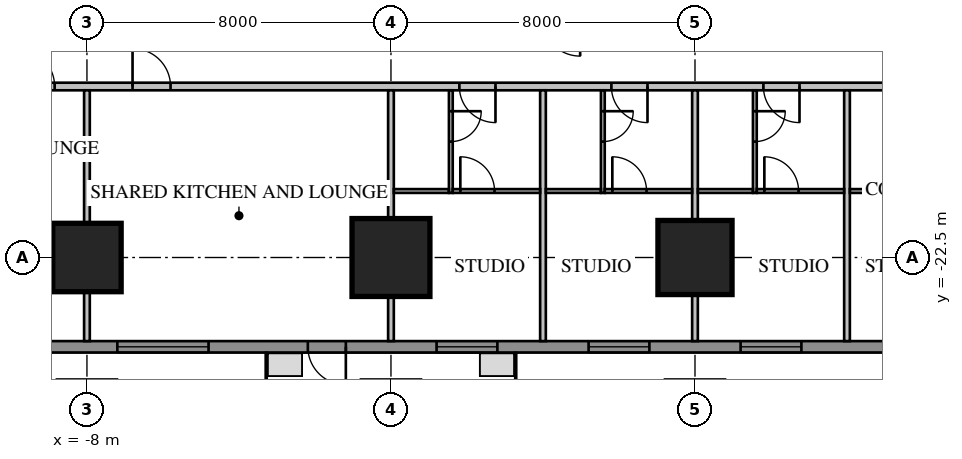
"""IFC4 building model, lengths in metres.
Left out: names, types, materials, properties, quantities, classifications, styles, units other than length and angle.
Written with IfcOpenShell. Run it as: python <this file> out.ifc"""

import sys

from ifc_helpers import new_model, si_unit, direction, frame, frame_2d, origin, origin_2d, place, context, subcontext, project, spatial, rectangle, extrude, element, fill, save


model = new_model("IFC4")
c1 = context("Model", 3, precision=1e-05, world=origin(), true_north=direction((0.0, 1.0)))
c2 = subcontext(c1, "Body", "Model", "MODEL_VIEW")
j1 = project(units=[si_unit("LENGTHUNIT", "METRE"), si_unit("PLANEANGLEUNIT", "RADIAN")], contexts=[c1])
p1 = place(None, origin())
s1 = spatial("IfcSite", under=j1, at=p1, CompositionType="ELEMENT")
p2 = place(p1, origin())
s2 = spatial("IfcBuilding", under=s1, at=p2, CompositionType="ELEMENT")
p3 = place(p2, frame((0.0, 0.0, 19.85)))
s3 = spatial("IfcBuildingStorey", under=s2, at=p3, CompositionType="ELEMENT", Elevation=19.85)
p4 = place(p3, frame((-8.0, -22.5, 0.0), z_axis=(0.0, 0.0, 1.0), x_axis=(1.0, 0.0, 0.0)))
e1 = element("IfcColumn", 1, at=p4, inside=s3, PredefinedType="COLUMN", context=c2, shape_type="SweptSolid", body=[
    extrude(rectangle(XDim=1.8, YDim=1.8, at=origin_2d()), origin(), (0.0, 0.0, 1.0), 3.85),
])
p5 = place(p3, frame((0.0, -22.5, 0.0), z_axis=(0.0, 0.0, 1.0), x_axis=(1.0, 0.0, 0.0)))
e2 = element("IfcColumn", 2, at=p5, inside=s3, PredefinedType="COLUMN", context=c2, shape_type="SweptSolid", body=[
    extrude(rectangle(XDim=2.05, YDim=2.05, at=origin_2d()), origin(), (0.0, 0.0, 1.0), 3.85),
])
p6 = place(p3, frame((8.0, -22.5, 0.0), z_axis=(0.0, 0.0, 1.0), x_axis=(1.0, 0.0, 0.0)))
e3 = element("IfcColumn", 3, at=p6, inside=s3, PredefinedType="COLUMN", context=c2, shape_type="SweptSolid", body=[
    extrude(rectangle(XDim=1.95, YDim=1.95, at=origin_2d()), origin(), (0.0, 0.0, 1.0), 3.85),
])
p7 = place(p3, frame((-16.0, -24.85, 0.0), z_axis=(0.0, 0.0, 1.0), x_axis=(1.0, 0.0, 0.0)))
e4 = element("IfcWall", 4, at=p7, inside=s3, PredefinedType="SOLIDWALL", context=c2, shape_type="SweptSolid", body=[
    extrude(rectangle(XDim=32.0, YDim=0.3, at=frame_2d((16.0, 0.0))), origin(), (0.0, 0.0, 1.0), 3.65),
])
p8 = place(p7, frame((1.2, 0.0, 0.75)))
e5 = element("IfcOpeningElement", 5, at=p8, cuts=e4, PredefinedType="OPENING", context=c2, shape_type="SweptSolid", body=[
    extrude(rectangle(XDim=1.6, YDim=1.8, at=frame_2d((0.8, 0.9))), frame((0.0, 0.17, 0.0), z_axis=(0.0, -1.0, 0.0), x_axis=(1.0, 0.0, 0.0)), (0.0, 0.0, 1.0), 0.34),
])
p9 = place(p7, frame((5.2, 0.0, 0.75)))
e6 = element("IfcOpeningElement", 6, at=p9, cuts=e4, PredefinedType="OPENING", context=c2, shape_type="SweptSolid", body=[
    extrude(rectangle(XDim=1.6, YDim=1.8, at=frame_2d((0.8, 0.9))), frame((0.0, 0.17, 0.0), z_axis=(0.0, -1.0, 0.0), x_axis=(1.0, 0.0, 0.0)), (0.0, 0.0, 1.0), 0.34),
])
p10 = place(p7, frame((17.2, 0.0, 0.75)))
e7 = element("IfcOpeningElement", 7, at=p10, cuts=e4, PredefinedType="OPENING", context=c2, shape_type="SweptSolid", body=[
    extrude(rectangle(XDim=1.6, YDim=1.8, at=frame_2d((0.8, 0.9))), frame((0.0, 0.17, 0.0), z_axis=(0.0, -1.0, 0.0), x_axis=(1.0, 0.0, 0.0)), (0.0, 0.0, 1.0), 0.34),
])
p11 = place(p7, frame((21.2, 0.0, 0.75)))
e8 = element("IfcOpeningElement", 8, at=p11, cuts=e4, PredefinedType="OPENING", context=c2, shape_type="SweptSolid", body=[
    extrude(rectangle(XDim=1.6, YDim=1.8, at=frame_2d((0.8, 0.9))), frame((0.0, 0.17, 0.0), z_axis=(0.0, -1.0, 0.0), x_axis=(1.0, 0.0, 0.0)), (0.0, 0.0, 1.0), 0.34),
])
p12 = place(p7, frame((25.2, 0.0, 0.75)))
e9 = element("IfcOpeningElement", 9, at=p12, cuts=e4, PredefinedType="OPENING", context=c2, shape_type="SweptSolid", body=[
    extrude(rectangle(XDim=1.6, YDim=1.8, at=frame_2d((0.8, 0.9))), frame((0.0, 0.17, 0.0), z_axis=(0.0, -1.0, 0.0), x_axis=(1.0, 0.0, 0.0)), (0.0, 0.0, 1.0), 0.34),
])
p13 = place(p7, frame((29.2, 0.0, 0.75)))
e10 = element("IfcOpeningElement", 10, at=p13, cuts=e4, PredefinedType="OPENING", context=c2, shape_type="SweptSolid", body=[
    extrude(rectangle(XDim=1.6, YDim=1.8, at=frame_2d((0.8, 0.9))), frame((0.0, 0.17, 0.0), z_axis=(0.0, -1.0, 0.0), x_axis=(1.0, 0.0, 0.0)), (0.0, 0.0, 1.0), 0.34),
])
p14 = place(p7, frame((8.8, 0.0, 0.75)))
e11 = element("IfcOpeningElement", 11, at=p14, cuts=e4, PredefinedType="OPENING", context=c2, shape_type="SweptSolid", body=[
    extrude(rectangle(XDim=2.4, YDim=1.8, at=frame_2d((1.2, 0.9))), frame((0.0, 0.17, 0.0), z_axis=(0.0, -1.0, 0.0), x_axis=(1.0, 0.0, 0.0)), (0.0, 0.0, 1.0), 0.34),
])
p15 = place(p7, frame((13.812, 0.0, 0.0)))
e12 = element("IfcOpeningElement", 12, at=p15, cuts=e4, PredefinedType="OPENING", context=c2, shape_type="SweptSolid", body=[
    extrude(rectangle(XDim=1.0, YDim=2.4, at=frame_2d((0.5, 1.2))), frame((0.0, 0.17, 0.0), z_axis=(0.0, -1.0, 0.0), x_axis=(1.0, 0.0, 0.0)), (0.0, 0.0, 1.0), 0.34),
])
p16 = place(p3, frame((-18.0, -18.0, 0.0), z_axis=(0.0, 0.0, 1.0), x_axis=(1.0, 0.0, 0.0)))
e13 = element("IfcWall", 13, at=p16, inside=s3, PredefinedType="PARTITIONING", context=c2, shape_type="SweptSolid", body=[
    extrude(rectangle(XDim=36.0, YDim=0.2, at=frame_2d((18.0, 0.0))), origin(), (0.0, 0.0, 1.0), 3.65),
])
p17 = place(p16, frame((0.375, 0.0, 0.0)))
e14 = element("IfcOpeningElement", 14, at=p17, cuts=e13, PredefinedType="OPENING", context=c2, shape_type="SweptSolid", body=[
    extrude(rectangle(XDim=1.0, YDim=2.1, at=frame_2d((0.5, 1.05))), frame((0.0, 0.12, 0.0), z_axis=(0.0, -1.0, 0.0), x_axis=(1.0, 0.0, 0.0)), (0.0, 0.0, 1.0), 0.24),
])
p18 = place(p16, frame((2.45, 0.0, 0.0)))
e15 = element("IfcOpeningElement", 15, at=p18, cuts=e13, PredefinedType="OPENING", context=c2, shape_type="SweptSolid", body=[
    extrude(rectangle(XDim=0.8, YDim=2.1, at=frame_2d((0.4, 1.05))), frame((0.0, 0.12, 0.0), z_axis=(0.0, -1.0, 0.0), x_axis=(1.0, 0.0, 0.0)), (0.0, 0.0, 1.0), 0.24),
])
p19 = place(p16, frame((4.05, 0.0, 0.0)))
e16 = element("IfcOpeningElement", 16, at=p19, cuts=e13, PredefinedType="OPENING", context=c2, shape_type="SweptSolid", body=[
    extrude(rectangle(XDim=1.0, YDim=2.1, at=frame_2d((0.5, 1.05))), frame((0.0, 0.12, 0.0), z_axis=(0.0, -1.0, 0.0), x_axis=(1.0, 0.0, 0.0)), (0.0, 0.0, 1.0), 0.24),
])
p20 = place(p16, frame((6.45, 0.0, 0.0)))
e17 = element("IfcOpeningElement", 17, at=p20, cuts=e13, PredefinedType="OPENING", context=c2, shape_type="SweptSolid", body=[
    extrude(rectangle(XDim=0.9, YDim=2.1, at=frame_2d((0.45, 1.05))), frame((0.0, 0.12, 0.0), z_axis=(0.0, -1.0, 0.0), x_axis=(1.0, 0.0, 0.0)), (0.0, 0.0, 1.0), 0.24),
])
p21 = place(p16, frame((8.15, 0.0, 0.0)))
e18 = element("IfcOpeningElement", 18, at=p21, cuts=e13, PredefinedType="OPENING", context=c2, shape_type="SweptSolid", body=[
    extrude(rectangle(XDim=1.0, YDim=2.1, at=frame_2d((0.5, 1.05))), frame((0.0, 0.12, 0.0), z_axis=(0.0, -1.0, 0.0), x_axis=(1.0, 0.0, 0.0)), (0.0, 0.0, 1.0), 0.24),
])
p22 = place(p16, frame((19.8, 0.0, 0.0)))
e19 = element("IfcOpeningElement", 19, at=p22, cuts=e13, PredefinedType="OPENING", context=c2, shape_type="SweptSolid", body=[
    extrude(rectangle(XDim=0.95, YDim=2.1, at=frame_2d((0.475, 1.05))), frame((0.0, 0.12, 0.0), z_axis=(0.0, -1.0, 0.0), x_axis=(1.0, 0.0, 0.0)), (0.0, 0.0, 1.0), 0.24),
])
p23 = place(p16, frame((23.8, 0.0, 0.0)))
e20 = element("IfcOpeningElement", 20, at=p23, cuts=e13, PredefinedType="OPENING", context=c2, shape_type="SweptSolid", body=[
    extrude(rectangle(XDim=0.95, YDim=2.1, at=frame_2d((0.475, 1.05))), frame((0.0, 0.12, 0.0), z_axis=(0.0, -1.0, 0.0), x_axis=(1.0, 0.0, 0.0)), (0.0, 0.0, 1.0), 0.24),
])
p24 = place(p16, frame((27.8, 0.0, 0.0)))
e21 = element("IfcOpeningElement", 21, at=p24, cuts=e13, PredefinedType="OPENING", context=c2, shape_type="SweptSolid", body=[
    extrude(rectangle(XDim=0.95, YDim=2.1, at=frame_2d((0.475, 1.05))), frame((0.0, 0.12, 0.0), z_axis=(0.0, -1.0, 0.0), x_axis=(1.0, 0.0, 0.0)), (0.0, 0.0, 1.0), 0.24),
])
p25 = place(p16, frame((31.8, 0.0, 0.0)))
e22 = element("IfcOpeningElement", 22, at=p25, cuts=e13, PredefinedType="OPENING", context=c2, shape_type="SweptSolid", body=[
    extrude(rectangle(XDim=0.95, YDim=2.1, at=frame_2d((0.475, 1.05))), frame((0.0, 0.12, 0.0), z_axis=(0.0, -1.0, 0.0), x_axis=(1.0, 0.0, 0.0)), (0.0, 0.0, 1.0), 0.24),
])
p26 = place(p16, frame((34.375, 0.0, 0.0)))
e23 = element("IfcOpeningElement", 23, at=p26, cuts=e13, PredefinedType="OPENING", context=c2, shape_type="SweptSolid", body=[
    extrude(rectangle(XDim=0.95, YDim=2.1, at=frame_2d((0.475, 1.05))), frame((0.0, 0.12, 0.0), z_axis=(0.0, -1.0, 0.0), x_axis=(1.0, 0.0, 0.0)), (0.0, 0.0, 1.0), 0.24),
])
p27 = place(p16, frame((11.2, 0.0, 0.0)))
e24 = element("IfcOpeningElement", 24, at=p27, cuts=e13, PredefinedType="OPENING", context=c2, shape_type="SweptSolid", body=[
    extrude(rectangle(XDim=1.0, YDim=2.1, at=frame_2d((0.5, 1.05))), frame((0.0, 0.12, 0.0), z_axis=(0.0, -1.0, 0.0), x_axis=(1.0, 0.0, 0.0)), (0.0, 0.0, 1.0), 0.24),
])
p28 = place(p3, frame((-8.0, -18.1, 0.0), z_axis=(0.0, 0.0, 1.0), x_axis=(0.0, -1.0, 0.0)))
e25 = element("IfcWall", 25, at=p28, inside=s3, PredefinedType="PARTITIONING", context=c2, shape_type="SweptSolid", body=[
    extrude(rectangle(XDim=6.6, YDim=0.15, at=frame_2d((3.3, 0.0))), origin(), (0.0, 0.0, 1.0), 3.65),
])
p29 = place(p3, frame((0.0, -18.1, 0.0), z_axis=(0.0, 0.0, 1.0), x_axis=(0.0, -1.0, 0.0)))
e26 = element("IfcWall", 26, at=p29, inside=s3, PredefinedType="PARTITIONING", context=c2, shape_type="SweptSolid", body=[
    extrude(rectangle(XDim=6.6, YDim=0.15, at=frame_2d((3.3, 0.0))), origin(), (0.0, 0.0, 1.0), 2.809),
])
for number, where, z_axis, x_axis in (
    (27, (4.0, -18.1, 0.0), (0.0, 0.0, 1.0), (0.0, -1.0, 0.0)),
    (28, (8.0, -18.1, 0.0), (0.0, 0.0, 1.0), (0.0, -1.0, 0.0)),
    (29, (12.0, -18.1, 0.0), (0.0, 0.0, 1.0), (0.0, -1.0, 0.0)),
):
    element("IfcWall", number, at=place(p3, frame(where, z_axis=z_axis, x_axis=x_axis)), inside=s3, PredefinedType="PARTITIONING", context=c2, shape_type="SweptSolid", body=[
        extrude(rectangle(XDim=6.6, YDim=0.15, at=frame_2d((3.3, 0.0))), origin(), (0.0, 0.0, 1.0), 3.65),
    ])
p30 = place(p3, frame((1.575, -18.1, 0.0), z_axis=(0.0, 0.0, 1.0), x_axis=(0.0, -1.0, 0.0)))
e30 = element("IfcWall", 30, at=p30, inside=s3, PredefinedType="PARTITIONING", context=c2, shape_type="SweptSolid", body=[
    extrude(rectangle(XDim=2.7, YDim=0.1, at=frame_2d((1.35, 0.0))), origin(), (0.0, 0.0, 1.0), 3.65),
])
p31 = place(p30, frame((0.55, 0.0, 0.0)))
e31 = element("IfcOpeningElement", 31, at=p31, cuts=e30, PredefinedType="OPENING", context=c2, shape_type="SweptSolid", body=[
    extrude(rectangle(XDim=0.8, YDim=2.1, at=frame_2d((0.4, 1.05))), frame((0.0, 0.07, 0.0), z_axis=(0.0, -1.0, 0.0), x_axis=(1.0, 0.0, 0.0)), (0.0, 0.0, 1.0), 0.14),
])
p32 = place(p3, frame((0.075, -20.75, 0.0), z_axis=(0.0, 0.0, 1.0), x_axis=(1.0, 0.0, 0.0)))
e32 = element("IfcWall", 32, at=p32, inside=s3, PredefinedType="PARTITIONING", context=c2, shape_type="SweptSolid", body=[
    extrude(rectangle(XDim=1.45, YDim=0.1, at=frame_2d((0.725, 0.0))), origin(), (0.0, 0.0, 1.0), 3.65),
])
p33 = place(p3, frame((5.575, -18.1, 0.0), z_axis=(0.0, 0.0, 1.0), x_axis=(0.0, -1.0, 0.0)))
e33 = element("IfcWall", 33, at=p33, inside=s3, PredefinedType="PARTITIONING", context=c2, shape_type="SweptSolid", body=[
    extrude(rectangle(XDim=2.7, YDim=0.1, at=frame_2d((1.35, 0.0))), origin(), (0.0, 0.0, 1.0), 3.65),
])
p34 = place(p33, frame((0.55, 0.0, 0.0)))
e34 = element("IfcOpeningElement", 34, at=p34, cuts=e33, PredefinedType="OPENING", context=c2, shape_type="SweptSolid", body=[
    extrude(rectangle(XDim=0.8, YDim=2.1, at=frame_2d((0.4, 1.05))), frame((0.0, 0.07, 0.0), z_axis=(0.0, -1.0, 0.0), x_axis=(1.0, 0.0, 0.0)), (0.0, 0.0, 1.0), 0.14),
])
p35 = place(p3, frame((4.075, -20.75, 0.0), z_axis=(0.0, 0.0, 1.0), x_axis=(1.0, 0.0, 0.0)))
e35 = element("IfcWall", 35, at=p35, inside=s3, PredefinedType="PARTITIONING", context=c2, shape_type="SweptSolid", body=[
    extrude(rectangle(XDim=1.45, YDim=0.1, at=frame_2d((0.725, 0.0))), origin(), (0.0, 0.0, 1.0), 3.65),
])
p36 = place(p3, frame((9.575, -18.1, 0.0), z_axis=(0.0, 0.0, 1.0), x_axis=(0.0, -1.0, 0.0)))
e36 = element("IfcWall", 36, at=p36, inside=s3, PredefinedType="PARTITIONING", context=c2, shape_type="SweptSolid", body=[
    extrude(rectangle(XDim=2.7, YDim=0.1, at=frame_2d((1.35, 0.0))), origin(), (0.0, 0.0, 1.0), 3.65),
])
p37 = place(p36, frame((0.55, 0.0, 0.0)))
e37 = element("IfcOpeningElement", 37, at=p37, cuts=e36, PredefinedType="OPENING", context=c2, shape_type="SweptSolid", body=[
    extrude(rectangle(XDim=0.8, YDim=2.1, at=frame_2d((0.4, 1.05))), frame((0.0, 0.07, 0.0), z_axis=(0.0, -1.0, 0.0), x_axis=(1.0, 0.0, 0.0)), (0.0, 0.0, 1.0), 0.14),
])
for number, where, z_axis, x_axis in (
    (38, (8.075, -20.75, 0.0), (0.0, 0.0, 1.0), (1.0, 0.0, 0.0)),
    (39, (12.075, -20.75, 0.0), (0.0, 0.0, 1.0), (1.0, 0.0, 0.0)),
):
    element("IfcWall", number, at=place(p3, frame(where, z_axis=z_axis, x_axis=x_axis)), inside=s3, PredefinedType="PARTITIONING", context=c2, shape_type="SweptSolid", body=[
        extrude(rectangle(XDim=1.45, YDim=0.1, at=frame_2d((0.725, 0.0))), origin(), (0.0, 0.0, 1.0), 3.65),
    ])
p38 = place(p3, frame((1.625, -20.75, 0.0), z_axis=(0.0, 0.0, 1.0), x_axis=(1.0, 0.0, 0.0)))
e40 = element("IfcWall", 40, at=p38, inside=s3, PredefinedType="PARTITIONING", context=c2, shape_type="SweptSolid", body=[
    extrude(rectangle(XDim=2.3, YDim=0.1, at=frame_2d((1.15, 0.0))), origin(), (0.0, 0.0, 1.0), 3.65),
])
p39 = place(p38, frame((0.2, 0.0, 0.0)))
e41 = element("IfcOpeningElement", 41, at=p39, cuts=e40, PredefinedType="OPENING", context=c2, shape_type="SweptSolid", body=[
    extrude(rectangle(XDim=0.9, YDim=2.1, at=frame_2d((0.45, 1.05))), frame((0.0, 0.07, 0.0), z_axis=(0.0, -1.0, 0.0), x_axis=(1.0, 0.0, 0.0)), (0.0, 0.0, 1.0), 0.14),
])
p40 = place(p3, frame((5.625, -20.75, 0.0), z_axis=(0.0, 0.0, 1.0), x_axis=(1.0, 0.0, 0.0)))
e42 = element("IfcWall", 42, at=p40, inside=s3, PredefinedType="PARTITIONING", context=c2, shape_type="SweptSolid", body=[
    extrude(rectangle(XDim=2.3, YDim=0.1, at=frame_2d((1.15, 0.0))), origin(), (0.0, 0.0, 1.0), 3.65),
])
p41 = place(p40, frame((0.2, 0.0, 0.0)))
e43 = element("IfcOpeningElement", 43, at=p41, cuts=e42, PredefinedType="OPENING", context=c2, shape_type="SweptSolid", body=[
    extrude(rectangle(XDim=0.9, YDim=2.1, at=frame_2d((0.45, 1.05))), frame((0.0, 0.07, 0.0), z_axis=(0.0, -1.0, 0.0), x_axis=(1.0, 0.0, 0.0)), (0.0, 0.0, 1.0), 0.14),
])
p42 = place(p3, frame((9.625, -20.75, 0.0), z_axis=(0.0, 0.0, 1.0), x_axis=(1.0, 0.0, 0.0)))
e44 = element("IfcWall", 44, at=p42, inside=s3, PredefinedType="PARTITIONING", context=c2, shape_type="SweptSolid", body=[
    extrude(rectangle(XDim=2.3, YDim=0.1, at=frame_2d((1.15, 0.0))), origin(), (0.0, 0.0, 1.0), 3.65),
])
p43 = place(p42, frame((0.2, 0.0, 0.0)))
e45 = element("IfcOpeningElement", 45, at=p43, cuts=e44, PredefinedType="OPENING", context=c2, shape_type="SweptSolid", body=[
    extrude(rectangle(XDim=0.9, YDim=2.1, at=frame_2d((0.45, 1.05))), frame((0.0, 0.07, 0.0), z_axis=(0.0, -1.0, 0.0), x_axis=(1.0, 0.0, 0.0)), (0.0, 0.0, 1.0), 0.14),
])
p44 = place(p10, origin())
e46 = element("IfcWindow", 46, at=p44, inside=s3, PartitioningType="SINGLE_PANEL", PredefinedType="WINDOW", context=c2, shape_type="SweptSolid", body=[
    extrude(rectangle(XDim=1.6, YDim=1.8, at=frame_2d((0.8, 0.9))), frame((0.0, 0.03, 0.0), z_axis=(0.0, -1.0, 0.0), x_axis=(1.0, 0.0, 0.0)), (0.0, 0.0, 1.0), 0.06),
])
fill(e7, e46)
p45 = place(p11, origin())
e47 = element("IfcWindow", 47, at=p45, inside=s3, PartitioningType="SINGLE_PANEL", PredefinedType="WINDOW", context=c2, shape_type="SweptSolid", body=[
    extrude(rectangle(XDim=1.6, YDim=1.8, at=frame_2d((0.8, 0.9))), frame((0.0, 0.03, 0.0), z_axis=(0.0, -1.0, 0.0), x_axis=(1.0, 0.0, 0.0)), (0.0, 0.0, 1.0), 0.06),
])
fill(e8, e47)
p46 = place(p12, origin())
e48 = element("IfcWindow", 48, at=p46, inside=s3, PartitioningType="SINGLE_PANEL", PredefinedType="WINDOW", context=c2, shape_type="SweptSolid", body=[
    extrude(rectangle(XDim=1.6, YDim=1.8, at=frame_2d((0.8, 0.9))), frame((0.0, 0.03, 0.0), z_axis=(0.0, -1.0, 0.0), x_axis=(1.0, 0.0, 0.0)), (0.0, 0.0, 1.0), 0.06),
])
fill(e9, e48)
p47 = place(p14, origin())
e49 = element("IfcWindow", 49, at=p47, inside=s3, PartitioningType="SINGLE_PANEL", PredefinedType="WINDOW", context=c2, shape_type="SweptSolid", body=[
    extrude(rectangle(XDim=2.4, YDim=1.8, at=frame_2d((1.2, 0.9))), frame((0.0, 0.03, 0.0), z_axis=(0.0, -1.0, 0.0), x_axis=(1.0, 0.0, 0.0)), (0.0, 0.0, 1.0), 0.06),
])
fill(e11, e49)
p48 = place(p15, origin())
e50 = element("IfcDoor", 50, at=p48, inside=s3, OperationType="SINGLE_SWING_RIGHT", PredefinedType="DOOR", context=c2, shape_type="SweptSolid", body=[
    extrude(rectangle(XDim=1.0, YDim=2.4, at=frame_2d((0.5, 1.2))), frame((0.0, 0.025, 0.0), z_axis=(0.0, -1.0, 0.0), x_axis=(1.0, 0.0, 0.0)), (0.0, 0.0, 1.0), 0.05),
])
fill(e12, e50)
p49 = place(p21, origin())
e51 = element("IfcDoor", 51, at=p49, inside=s3, OperationType="SINGLE_SWING_LEFT", PredefinedType="DOOR", context=c2, shape_type="SweptSolid", body=[
    extrude(rectangle(XDim=1.0, YDim=2.1, at=frame_2d((0.5, 1.05))), frame((0.0, 0.025, 0.0), z_axis=(0.0, -1.0, 0.0), x_axis=(1.0, 0.0, 0.0)), (0.0, 0.0, 1.0), 0.05),
])
fill(e18, e51)
p50 = place(p22, origin())
e52 = element("IfcDoor", 52, at=p50, inside=s3, OperationType="SINGLE_SWING_RIGHT", PredefinedType="DOOR", context=c2, shape_type="SweptSolid", body=[
    extrude(rectangle(XDim=0.95, YDim=2.1, at=frame_2d((0.475, 1.05))), frame((0.0, 0.025, 0.0), z_axis=(0.0, -1.0, 0.0), x_axis=(1.0, 0.0, 0.0)), (0.0, 0.0, 1.0), 0.05),
])
fill(e19, e52)
p51 = place(p31, origin())
e53 = element("IfcDoor", 53, at=p51, inside=s3, OperationType="SINGLE_SWING_LEFT", PredefinedType="DOOR", context=c2, shape_type="SweptSolid", body=[
    extrude(rectangle(XDim=0.8, YDim=2.1, at=frame_2d((0.4, 1.05))), frame((0.0, 0.025, 0.0), z_axis=(0.0, -1.0, 0.0), x_axis=(1.0, 0.0, 0.0)), (0.0, 0.0, 1.0), 0.05),
])
fill(e31, e53)
p52 = place(p23, origin())
e54 = element("IfcDoor", 54, at=p52, inside=s3, OperationType="SINGLE_SWING_RIGHT", PredefinedType="DOOR", context=c2, shape_type="SweptSolid", body=[
    extrude(rectangle(XDim=0.95, YDim=2.1, at=frame_2d((0.475, 1.05))), frame((0.0, 0.025, 0.0), z_axis=(0.0, -1.0, 0.0), x_axis=(1.0, 0.0, 0.0)), (0.0, 0.0, 1.0), 0.05),
])
fill(e20, e54)
p53 = place(p34, origin())
e55 = element("IfcDoor", 55, at=p53, inside=s3, OperationType="SINGLE_SWING_LEFT", PredefinedType="DOOR", context=c2, shape_type="SweptSolid", body=[
    extrude(rectangle(XDim=0.8, YDim=2.1, at=frame_2d((0.4, 1.05))), frame((0.0, 0.025, 0.0), z_axis=(0.0, -1.0, 0.0), x_axis=(1.0, 0.0, 0.0)), (0.0, 0.0, 1.0), 0.05),
])
fill(e34, e55)
p54 = place(p24, origin())
e56 = element("IfcDoor", 56, at=p54, inside=s3, OperationType="SINGLE_SWING_RIGHT", PredefinedType="DOOR", context=c2, shape_type="SweptSolid", body=[
    extrude(rectangle(XDim=0.95, YDim=2.1, at=frame_2d((0.475, 1.05))), frame((0.0, 0.025, 0.0), z_axis=(0.0, -1.0, 0.0), x_axis=(1.0, 0.0, 0.0)), (0.0, 0.0, 1.0), 0.05),
])
fill(e21, e56)
p55 = place(p37, origin())
e57 = element("IfcDoor", 57, at=p55, inside=s3, OperationType="SINGLE_SWING_LEFT", PredefinedType="DOOR", context=c2, shape_type="SweptSolid", body=[
    extrude(rectangle(XDim=0.8, YDim=2.1, at=frame_2d((0.4, 1.05))), frame((0.0, 0.025, 0.0), z_axis=(0.0, -1.0, 0.0), x_axis=(1.0, 0.0, 0.0)), (0.0, 0.0, 1.0), 0.05),
])
fill(e37, e57)
p56 = place(p27, origin())
e58 = element("IfcDoor", 58, at=p56, inside=s3, OperationType="SINGLE_SWING_LEFT", PredefinedType="DOOR", context=c2, shape_type="SweptSolid", body=[
    extrude(rectangle(XDim=1.0, YDim=2.1, at=frame_2d((0.5, 1.05))), frame((0.0, 0.025, 0.0), z_axis=(0.0, -1.0, 0.0), x_axis=(1.0, 0.0, 0.0)), (0.0, 0.0, 1.0), 0.05),
])
fill(e24, e58)
p57 = place(p39, origin())
e59 = element("IfcDoor", 59, at=p57, inside=s3, OperationType="SINGLE_SWING_LEFT", PredefinedType="DOOR", context=c2, shape_type="SweptSolid", body=[
    extrude(rectangle(XDim=0.9, YDim=2.1, at=frame_2d((0.45, 1.05))), frame((0.0, 0.025, 0.0), z_axis=(0.0, -1.0, 0.0), x_axis=(1.0, 0.0, 0.0)), (0.0, 0.0, 1.0), 0.05),
])
fill(e41, e59)
p58 = place(p41, origin())
e60 = element("IfcDoor", 60, at=p58, inside=s3, OperationType="SINGLE_SWING_LEFT", PredefinedType="DOOR", context=c2, shape_type="SweptSolid", body=[
    extrude(rectangle(XDim=0.9, YDim=2.1, at=frame_2d((0.45, 1.05))), frame((0.0, 0.025, 0.0), z_axis=(0.0, -1.0, 0.0), x_axis=(1.0, 0.0, 0.0)), (0.0, 0.0, 1.0), 0.05),
])
fill(e43, e60)
p59 = place(p43, origin())
e61 = element("IfcDoor", 61, at=p59, inside=s3, OperationType="SINGLE_SWING_LEFT", PredefinedType="DOOR", context=c2, shape_type="SweptSolid", body=[
    extrude(rectangle(XDim=0.9, YDim=2.1, at=frame_2d((0.45, 1.05))), frame((0.0, 0.025, 0.0), z_axis=(0.0, -1.0, 0.0), x_axis=(1.0, 0.0, 0.0)), (0.0, 0.0, 1.0), 0.05),
])
fill(e45, e61)
save(model, sys.argv[1])
